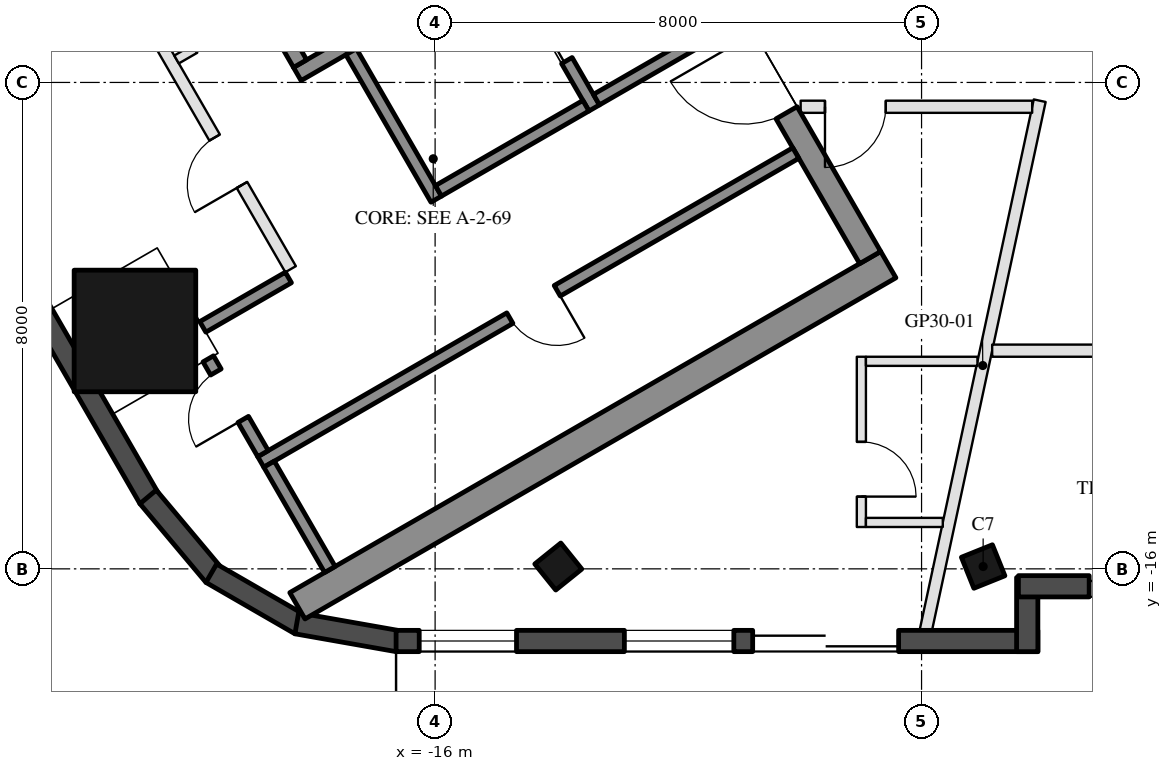
"""IFC4 building model, lengths in metres.
Left out: names, types, materials, properties, quantities, classifications, styles, units other than length and angle.
Written with IfcOpenShell. Run it as: python <this file> out.ifc"""

import sys

from ifc_helpers import new_model, si_unit, direction, frame, frame_2d, origin, origin_2d, place, context, subcontext, project, spatial, rectangle, hollow_rectangle, extrude, boolean, halfspace, element, fill, save


model = new_model("IFC4")
c1 = context("Model", 3, precision=1e-05, world=origin(), true_north=direction((0.0, 1.0)))
c2 = subcontext(c1, "Body", "Model", "MODEL_VIEW")
j1 = project(units=[si_unit("LENGTHUNIT", "METRE"), si_unit("PLANEANGLEUNIT", "RADIAN")], contexts=[c1])
p1 = place(None, origin())
s1 = spatial("IfcSite", under=j1, at=p1, CompositionType="ELEMENT")
p2 = place(p1, origin())
s2 = spatial("IfcBuilding", under=s1, at=p2, CompositionType="ELEMENT")
p3 = place(p2, frame((0.0, 0.0, 298.5)))
s3 = spatial("IfcBuildingStorey", under=s2, at=p3, CompositionType="ELEMENT", Elevation=298.5)
p4 = place(p3, frame((-13.974, -15.962, 0.0), z_axis=(0.121006106938, 0.150399778714, 0.981191840899), x_axis=(-0.992607126943, 0.008959505222, 0.121040566785)))
e1 = element("IfcColumn", 1, at=p4, inside=s3, PredefinedType="COLUMN", context=c2, shape_type="SweptSolid", body=[
    boolean("DIFFERENCE", boolean("DIFFERENCE", extrude(hollow_rectangle(XDim=0.55, YDim=0.55, WallThickness=0.025, at=origin_2d()), origin(), (0.0, 0.0, 1.0), 3.771), halfspace(frame((0.0, 0.0, 0.04), z_axis=(0.0, 0.0, 1.0), x_axis=(1.0, 0.0, 0.0)), True)), halfspace(frame((0.0, 0.0, 3.731), z_axis=(0.0, 0.0, 1.0), x_axis=(1.0, 0.0, 0.0)), False)),
])
p5 = place(p3, frame((-6.987, -15.962, 0.0), z_axis=(0.060870463553, 0.151232178432, 0.986622326361), x_axis=(-0.998135049207, 0.004661833801, 0.060866171632)))
e2 = element("IfcColumn", 2, at=p5, inside=s3, PredefinedType="COLUMN", context=c2, shape_type="SweptSolid", body=[
    boolean("DIFFERENCE", boolean("DIFFERENCE", extrude(hollow_rectangle(XDim=0.55, YDim=0.55, WallThickness=0.025, at=origin_2d()), origin(), (0.0, 0.0, 1.0), 3.75), halfspace(frame((0.0, 0.0, 0.034), z_axis=(0.0, 0.0, 1.0), x_axis=(1.0, 0.0, 0.0)), True)), halfspace(frame((0.0, 0.0, 3.716), z_axis=(0.0, 0.0, 1.0), x_axis=(1.0, 0.0, 0.0)), False)),
])
p6 = place(p3, frame((-20.936, -12.087, 0.0), z_axis=(0.190408197016, 0.109880592395, 0.975536249416), x_axis=(-0.499868084483, 0.866101551773, 1.1510724e-05)))
e3 = element("IfcColumn", 3, at=p6, inside=s3, PredefinedType="COLUMN", context=c2, shape_type="SweptSolid", body=[
    boolean("DIFFERENCE", boolean("DIFFERENCE", extrude(hollow_rectangle(XDim=2.0, YDim=2.0, WallThickness=0.05, at=origin_2d()), origin(), (0.0, 0.0, 1.0), 3.793), halfspace(frame((0.0, 0.0, 0.113), z_axis=(0.0, 0.0, 1.0), x_axis=(1.0, 0.0, 0.0)), True)), halfspace(frame((0.0, 0.0, 3.679), z_axis=(0.0, 0.0, 1.0), x_axis=(1.0, 0.0, 0.0)), False)),
])
p7 = place(p3, frame((-23.205, -10.508, 0.0), z_axis=(0.0, 0.0, 1.0), x_axis=(0.500016662025, -0.866015783746, 0.0)))
e4 = element("IfcWall", 4, at=p7, inside=s3, PredefinedType="SOLIDWALL", context=c2, shape_type="SweptSolid", body=[
    extrude(rectangle(XDim=5.004, YDim=0.35, at=frame_2d((2.502, 0.0))), origin(), (0.0, 0.0, 1.0), 3.55),
])
p8 = place(p3, frame((-20.72, -14.817, 0.0), z_axis=(0.0, 0.0, 1.0), x_axis=(0.642697100627, -0.766120380127, 0.0)))
e5 = element("IfcWall", 5, at=p8, inside=s3, PredefinedType="SOLIDWALL", context=c2, shape_type="SweptSolid", body=[
    extrude(rectangle(XDim=1.689, YDim=0.35, at=frame_2d((0.845, 0.0))), origin(), (0.0, 0.0, 1.0), 3.55),
])
for number, where, z_axis, x_axis in (
    (6, (-19.681, -16.072, 0.0), (0.0, 0.0, 1.0), (0.866, -0.5, 0.0)),
    (7, (-18.275, -16.896, 0.0), (0.0, 0.0, 1.0), (0.985, -0.174, 0.0)),
):
    element("IfcWall", number, at=place(p3, frame(where, z_axis=z_axis, x_axis=x_axis)), inside=s3, PredefinedType="SOLIDWALL", context=c2, shape_type="SweptSolid", body=[
        extrude(rectangle(XDim=1.689, YDim=0.35, at=frame_2d((0.845, 0.0))), origin(), (0.0, 0.0, 1.0), 3.55),
    ])
p9 = place(p3, frame((-16.642, -17.187, 0.0), z_axis=(0.0, 0.0, 1.0), x_axis=(1.0, 0.0, 0.0)))
e8 = element("IfcWall", 8, at=p9, inside=s3, PredefinedType="SOLIDWALL", context=c2, shape_type="SweptSolid", body=[
    extrude(rectangle(XDim=10.554, YDim=0.35, at=frame_2d((5.277, 0.0))), origin(), (0.0, 0.0, 1.0), 3.55),
])
p10 = place(p9, frame((0.38, 0.0, 0.3)))
e9 = element("IfcOpeningElement", 9, at=p10, cuts=e8, PredefinedType="OPENING", context=c2, shape_type="SweptSolid", body=[
    extrude(rectangle(XDim=1.6, YDim=2.65, at=frame_2d((0.8, 1.325))), frame((0.0, 0.185, 0.0), z_axis=(0.0, -1.0, 0.0), x_axis=(1.0, 0.0, 0.0)), (0.0, 0.0, 1.0), 0.37),
])
p11 = place(p9, frame((5.864, 0.0, 0.0)))
e10 = element("IfcOpeningElement", 10, at=p11, cuts=e8, PredefinedType="OPENING", context=c2, shape_type="SweptSolid", body=[
    extrude(rectangle(XDim=2.4, YDim=2.4, at=frame_2d((1.2, 1.2))), frame((0.0, 0.185, 0.0), z_axis=(0.0, -1.0, 0.0), x_axis=(1.0, 0.0, 0.0)), (0.0, 0.0, 1.0), 0.37),
])
p12 = place(p9, frame((3.754, 0.0, 0.3)))
e11 = element("IfcOpeningElement", 11, at=p12, cuts=e8, PredefinedType="OPENING", context=c2, shape_type="SweptSolid", body=[
    extrude(rectangle(XDim=1.8, YDim=2.65, at=frame_2d((0.9, 1.325))), frame((0.0, 0.185, 0.0), z_axis=(0.0, -1.0, 0.0), x_axis=(1.0, 0.0, 0.0)), (0.0, 0.0, 1.0), 0.37),
])
p13 = place(p3, frame((-6.262, -17.362, 0.0), z_axis=(0.0, 0.0, 1.0), x_axis=(0.0, 1.0, 0.0)))
e12 = element("IfcWall", 12, at=p13, inside=s3, PredefinedType="SOLIDWALL", context=c2, shape_type="SweptSolid", body=[
    extrude(rectangle(XDim=1.22, YDim=0.35, at=frame_2d((0.61, 0.0))), origin(), (0.0, 0.0, 1.0), 3.55),
])
p14 = place(p3, frame((-6.407, -16.287, 0.0), z_axis=(0.0, 0.0, 1.0), x_axis=(1.0, 0.0, 0.0)))
e13 = element("IfcWall", 13, at=p14, inside=s3, PredefinedType="SOLIDWALL", context=c2, shape_type="SweptSolid", body=[
    extrude(rectangle(XDim=5.827, YDim=0.35, at=frame_2d((2.914, 0.0))), origin(), (0.0, 0.0, 1.0), 3.55),
])
p15 = place(p14, frame((1.164, 0.0, 0.0)))
e14 = element("IfcOpeningElement", 14, at=p15, cuts=e13, PredefinedType="OPENING", context=c2, shape_type="SweptSolid", body=[
    extrude(rectangle(XDim=2.4, YDim=2.4, at=frame_2d((1.2, 1.2))), frame((0.0, 0.185, 0.0), z_axis=(0.0, -1.0, 0.0), x_axis=(1.0, 0.0, 0.0)), (0.0, 0.0, 1.0), 0.37),
])
for number, where, z_axis, x_axis in (
    (15, (-13.797, -1.903, 0.0), (0.0, 0.0, 1.0), (-0.866, -0.5, 0.0)),
    (16, (-8.547, -10.997, 0.0), (0.0, 0.0, 1.0), (-0.866, -0.5, 0.0)),
):
    element("IfcWall", number, at=place(p3, frame(where, z_axis=z_axis, x_axis=x_axis)), inside=s3, PredefinedType="SHEAR", context=c2, shape_type="SweptSolid", body=[
        extrude(rectangle(XDim=11.222, YDim=0.5, at=frame_2d((5.611, 0.0))), origin(), (0.0, 0.0, 1.0), 3.5),
    ])
p16 = place(p3, frame((-13.845, -2.22, 0.0), z_axis=(0.0, 0.0, 1.0), x_axis=(0.500004234368, -0.866022959057, 0.0)))
e17 = element("IfcWall", 17, at=p16, inside=s3, PredefinedType="SHEAR", context=c2, shape_type="SweptSolid", body=[
    extrude(rectangle(XDim=10.0, YDim=0.4, at=frame_2d((5.0, 0.0))), origin(), (0.0, 0.0, 1.0), 3.5),
])
p17 = place(p16, frame((3.55, 0.0, 0.0)))
e18 = element("IfcOpeningElement", 18, at=p17, cuts=e17, PredefinedType="OPENING", context=c2, shape_type="SweptSolid", body=[
    extrude(rectangle(XDim=1.1, YDim=2.1, at=frame_2d((0.55, 1.05))), frame((0.0, 0.21, 0.0), z_axis=(0.0, -1.0, 0.0), x_axis=(1.0, 0.0, 0.0)), (0.0, 0.0, 1.0), 0.42),
])
p18 = place(p16, frame((5.85, 0.0, 0.0)))
e19 = element("IfcOpeningElement", 19, at=p18, cuts=e17, PredefinedType="OPENING", context=c2, shape_type="SweptSolid", body=[
    extrude(rectangle(XDim=1.4, YDim=2.1, at=frame_2d((0.7, 1.05))), frame((0.0, 0.21, 0.0), z_axis=(0.0, -1.0, 0.0), x_axis=(1.0, 0.0, 0.0)), (0.0, 0.0, 1.0), 0.42),
])
p19 = place(p3, frame((-12.681, -4.636, 0.0), z_axis=(0.0, 0.0, 1.0), x_axis=(-0.866021702275, -0.500006411147, 0.0)))
e20 = element("IfcWall", 20, at=p19, inside=s3, PredefinedType="SHEAR", context=c2, shape_type="SweptSolid", body=[
    extrude(rectangle(XDim=6.45, YDim=0.25, at=frame_2d((3.225, 0.0))), origin(), (0.0, 0.0, 1.0), 3.5),
])
p20 = place(p19, frame((0.3, 0.0, 0.0)))
e21 = element("IfcOpeningElement", 21, at=p20, cuts=e20, PredefinedType="OPENING", context=c2, shape_type="SweptSolid", body=[
    extrude(rectangle(XDim=1.0, YDim=2.1, at=frame_2d((0.5, 1.05))), frame((0.0, 0.135, 0.0), z_axis=(0.0, -1.0, 0.0), x_axis=(1.0, 0.0, 0.0)), (0.0, 0.0, 1.0), 0.27),
])
p21 = place(p3, frame((-19.496, -5.482, 0.0), z_axis=(0.0, 0.0, 1.0), x_axis=(0.499990435942, -0.866030925526, 0.0)))
e22 = element("IfcWall", 22, at=p21, inside=s3, PredefinedType="SHEAR", context=c2, shape_type="SweptSolid", body=[
    extrude(rectangle(XDim=2.55, YDim=0.25, at=frame_2d((1.275, 0.0))), origin(), (0.0, 0.0, 1.0), 3.5),
])
p22 = place(p3, frame((-17.381, -7.495, 0.0), z_axis=(0.0, 0.0, 1.0), x_axis=(0.500011755427, -0.866018616679, 0.0)))
e23 = element("IfcWall", 23, at=p22, inside=s3, PredefinedType="SHEAR", context=c2, shape_type="SweptSolid", body=[
    extrude(rectangle(XDim=2.8, YDim=0.2, at=frame_2d((1.4, 0.0))), origin(), (0.0, 0.0, 1.0), 3.5),
])
p23 = place(p3, frame((-14.783, -5.995, 0.0), z_axis=(0.0, 0.0, 1.0), x_axis=(0.49994636267, -0.866056369097, 0.0)))
e24 = element("IfcWall", 24, at=p23, inside=s3, PredefinedType="SHEAR", context=c2, shape_type="SweptSolid", body=[
    extrude(rectangle(XDim=2.8, YDim=0.2, at=frame_2d((1.4, 0.0))), origin(), (0.0, 0.0, 1.0), 3.5),
])
p24 = place(p23, frame((0.7, 0.0, 0.0)))
e25 = element("IfcOpeningElement", 25, at=p24, cuts=e24, PredefinedType="OPENING", context=c2, shape_type="SweptSolid", body=[
    extrude(rectangle(XDim=1.2, YDim=2.1, at=frame_2d((0.6, 1.05))), frame((0.0, 0.11, 0.0), z_axis=(0.0, -1.0, 0.0), x_axis=(1.0, 0.0, 0.0)), (0.0, 0.0, 1.0), 0.22),
])
p25 = place(p3, frame((-13.52, -8.383, 0.0), z_axis=(0.0, 0.0, 1.0), x_axis=(-0.866034573852, -0.49998411664, 0.0)))
e26 = element("IfcWall", 26, at=p25, inside=s3, PredefinedType="SHEAR", context=c2, shape_type="SweptSolid", body=[
    extrude(rectangle(XDim=2.8, YDim=0.2, at=frame_2d((1.4, 0.0))), origin(), (0.0, 0.0, 1.0), 3.5),
])
p26 = place(p3, frame((-11.268, -7.083, 0.0), z_axis=(0.0, 0.0, 1.0), x_axis=(-0.866050077142, -0.499957262057, 0.0)))
e27 = element("IfcWall", 27, at=p26, inside=s3, PredefinedType="SHEAR", context=c2, shape_type="SweptSolid", body=[
    extrude(rectangle(XDim=2.4, YDim=0.2, at=frame_2d((1.2, 0.0))), origin(), (0.0, 0.0, 1.0), 3.5),
])
p27 = place(p3, frame((-10.068, -9.162, 0.0), z_axis=(0.0, 0.0, 1.0), x_axis=(-0.866032725843, -0.499987317609, 0.0)))
e28 = element("IfcWall", 28, at=p27, inside=s3, PredefinedType="SHEAR", context=c2, shape_type="SweptSolid", body=[
    extrude(rectangle(XDim=10.16, YDim=0.2, at=frame_2d((5.08, 0.0))), origin(), (0.0, 0.0, 1.0), 3.5),
])
p28 = place(p27, frame((4.53, 0.0, 0.0)))
e29 = element("IfcOpeningElement", 29, at=p28, cuts=e28, PredefinedType="OPENING", context=c2, shape_type="SweptSolid", body=[
    extrude(rectangle(XDim=0.9, YDim=2.1, at=frame_2d((0.45, 1.05))), frame((0.0, 0.11, 0.0), z_axis=(0.0, -1.0, 0.0), x_axis=(1.0, 0.0, 0.0)), (0.0, 0.0, 1.0), 0.22),
])
p29 = place(p3, frame((-19.73, -12.546, 0.0), z_axis=(0.0, 0.0, 1.0), x_axis=(0.500004188491, -0.866022985545, 0.0)))
e30 = element("IfcWall", 30, at=p29, inside=s3, PredefinedType="SHEAR", context=c2, shape_type="SweptSolid", body=[
    extrude(rectangle(XDim=1.8, YDim=0.2, at=frame_2d((0.9, 0.0))), origin(), (0.0, 0.0, 1.0), 3.5),
])
p30 = place(p29, frame((0.25, 0.0, 0.0)))
e31 = element("IfcOpeningElement", 31, at=p30, cuts=e30, PredefinedType="OPENING", context=c2, shape_type="SweptSolid", body=[
    extrude(rectangle(XDim=0.9, YDim=2.1, at=frame_2d((0.45, 1.05))), frame((0.0, 0.11, 0.0), z_axis=(0.0, -1.0, 0.0), x_axis=(1.0, 0.0, 0.0)), (0.0, 0.0, 1.0), 0.22),
])
p31 = place(p3, frame((-18.413, -11.208, 0.0), z_axis=(0.0, 0.0, 1.0), x_axis=(-0.866053003207, -0.499952193351, 0.0)))
e32 = element("IfcWall", 32, at=p31, inside=s3, PredefinedType="SHEAR", context=c2, shape_type="SweptSolid", body=[
    extrude(rectangle(XDim=1.625, YDim=0.2, at=frame_2d((0.812, 0.0))), origin(), (0.0, 0.0, 1.0), 3.5),
])
p32 = place(p3, frame((-18.73, -14.278, 0.0), z_axis=(0.0, 0.0, 1.0), x_axis=(0.50002537861, -0.866010750942, 0.0)))
e33 = element("IfcWall", 33, at=p32, inside=s3, PredefinedType="SHEAR", context=c2, shape_type="SweptSolid", body=[
    extrude(rectangle(XDim=2.0, YDim=0.2, at=frame_2d((1.0, 0.0))), origin(), (0.0, 0.0, 1.0), 3.5),
])
p33 = place(p3, frame((-21.076, -6.395, 0.0), z_axis=(0.0, 0.0, 1.0), x_axis=(0.50001468107, -0.866016927499, 0.0)))
e34 = element("IfcWall", 34, at=p33, inside=s3, PredefinedType="PARTITIONING", context=c2, shape_type="SweptSolid", body=[
    extrude(rectangle(XDim=5.4, YDim=0.2, at=frame_2d((2.7, 0.0))), origin(), (0.0, 0.0, 1.0), 3.5),
])
p34 = place(p33, frame((2.9, 0.0, 0.0)))
e35 = element("IfcOpeningElement", 35, at=p34, cuts=e34, PredefinedType="OPENING", context=c2, shape_type="SweptSolid", body=[
    extrude(rectangle(XDim=0.9, YDim=2.1, at=frame_2d((0.45, 1.05))), frame((0.0, 0.11, 0.0), z_axis=(0.0, -1.0, 0.0), x_axis=(1.0, 0.0, 0.0)), (0.0, 0.0, 1.0), 0.22),
])
p35 = place(p3, frame((-18.866, -6.822, 0.0), z_axis=(0.0, 0.0, 1.0), x_axis=(-0.866028054938, -0.499995408039, 0.0)))
e36 = element("IfcWall", 36, at=p35, inside=s3, PredefinedType="PARTITIONING", context=c2, shape_type="SweptSolid", body=[
    extrude(rectangle(XDim=1.6, YDim=0.15, at=frame_2d((0.8, 0.0))), origin(), (0.0, 0.0, 1.0), 3.5),
])
p36 = place(p35, frame((0.35, 0.0, 0.0)))
e37 = element("IfcOpeningElement", 37, at=p36, cuts=e36, PredefinedType="OPENING", context=c2, shape_type="SweptSolid", body=[
    extrude(rectangle(XDim=0.9, YDim=2.1, at=frame_2d((0.45, 1.05))), frame((0.0, 0.085, 0.0), z_axis=(0.0, -1.0, 0.0), x_axis=(1.0, 0.0, 0.0)), (0.0, 0.0, 1.0), 0.17),
])
p37 = place(p3, frame((-7.93, -17.012, 0.0), z_axis=(0.0, 0.0, 1.0), x_axis=(0.210200768645, 0.97765824134, 0.0)))
e38 = element("IfcWall", 38, at=p37, inside=s3, PredefinedType="PARTITIONING", context=c2, shape_type="SweptSolid", body=[
    extrude(rectangle(XDim=8.911, YDim=0.2, at=frame_2d((4.455, 0.0))), origin(), (0.0, 0.0, 1.0), 3.1),
])
p38 = place(p3, frame((-6.181, -8.4, 0.0), z_axis=(0.0, 0.0, 1.0), x_axis=(-1.0, 0.0, 0.0)))
e39 = element("IfcWall", 39, at=p38, inside=s3, PredefinedType="PARTITIONING", context=c2, shape_type="SweptSolid", body=[
    extrude(rectangle(XDim=3.807, YDim=0.2, at=frame_2d((1.904, 0.0))), origin(), (0.0, 0.0, 1.0), 3.1),
])
p39 = place(p38, frame((2.407, 0.0, 0.0)))
e40 = element("IfcOpeningElement", 40, at=p39, cuts=e39, PredefinedType="OPENING", context=c2, shape_type="SweptSolid", body=[
    extrude(rectangle(XDim=1.0, YDim=2.1, at=frame_2d((0.5, 1.05))), frame((0.0, 0.11, 0.0), z_axis=(0.0, -1.0, 0.0), x_axis=(1.0, 0.0, 0.0)), (0.0, 0.0, 1.0), 0.22),
])
p40 = place(p3, frame((-8.99, -12.512, 0.0), z_axis=(0.0, 0.0, 1.0), x_axis=(0.0, -1.0, 0.0)))
e41 = element("IfcWall", 41, at=p40, inside=s3, PredefinedType="PARTITIONING", context=c2, shape_type="SweptSolid", body=[
    extrude(rectangle(XDim=2.8, YDim=0.15, at=frame_2d((1.4, 0.0))), origin(), (0.0, 0.0, 1.0), 3.1),
])
p41 = place(p40, frame((1.4, 0.0, 0.0)))
e42 = element("IfcOpeningElement", 42, at=p41, cuts=e41, PredefinedType="OPENING", context=c2, shape_type="SweptSolid", body=[
    extrude(rectangle(XDim=0.9, YDim=2.1, at=frame_2d((0.45, 1.05))), frame((0.0, 0.085, 0.0), z_axis=(0.0, -1.0, 0.0), x_axis=(1.0, 0.0, 0.0)), (0.0, 0.0, 1.0), 0.17),
])
p42 = place(p3, frame((-8.915, -15.237, 0.0), z_axis=(0.0, 0.0, 1.0), x_axis=(1.0, 0.0, 0.0)))
e43 = element("IfcWall", 43, at=p42, inside=s3, PredefinedType="PARTITIONING", context=c2, shape_type="SweptSolid", body=[
    extrude(rectangle(XDim=1.264, YDim=0.15, at=frame_2d((0.632, 0.0))), origin(), (0.0, 0.0, 1.0), 3.1),
])
p43 = place(p3, frame((-8.915, -12.587, 0.0), z_axis=(0.0, 0.0, 1.0), x_axis=(1.0, 0.0, 0.0)))
e44 = element("IfcWall", 44, at=p43, inside=s3, PredefinedType="PARTITIONING", context=c2, shape_type="SweptSolid", body=[
    extrude(rectangle(XDim=1.834, YDim=0.15, at=frame_2d((0.917, 0.0))), origin(), (0.0, 0.0, 1.0), 3.55),
])
p44 = place(p3, frame((-2.1, -12.412, 0.0), z_axis=(0.0, 0.0, 1.0), x_axis=(-1.0, 0.0, 0.0)))
e45 = element("IfcWall", 45, at=p44, inside=s3, PredefinedType="PARTITIONING", context=c2, shape_type="SweptSolid", body=[
    extrude(rectangle(XDim=4.739, YDim=0.2, at=frame_2d((2.369, 0.0))), origin(), (0.0, 0.0, 1.0), 3.1),
])
p45 = place(p44, frame((1.869, 0.0, 0.0)))
e46 = element("IfcOpeningElement", 46, at=p45, cuts=e45, PredefinedType="OPENING", context=c2, shape_type="SweptSolid", body=[
    extrude(rectangle(XDim=1.0, YDim=2.1, at=frame_2d((0.5, 1.05))), frame((0.0, 0.11, 0.0), z_axis=(0.0, -1.0, 0.0), x_axis=(1.0, 0.0, 0.0)), (0.0, 0.0, 1.0), 0.22),
])
p46 = place(p10, origin())
e47 = element("IfcWindow", 47, at=p46, inside=s3, PartitioningType="SINGLE_PANEL", PredefinedType="WINDOW", context=c2, shape_type="SweptSolid", body=[
    extrude(rectangle(XDim=1.6, YDim=2.65, at=frame_2d((0.8, 1.325))), frame((0.0, 0.03, 0.0), z_axis=(0.0, -1.0, 0.0), x_axis=(1.0, 0.0, 0.0)), (0.0, 0.0, 1.0), 0.06),
])
fill(e9, e47)
p47 = place(p11, frame((2.4, 0.0, 0.0), z_axis=(0.0, 0.0, 1.0), x_axis=(-1.0, 0.0, 0.0)))
e48 = element("IfcDoor", 48, at=p47, inside=s3, OperationType="SLIDING_TO_LEFT", PredefinedType="DOOR", context=c2, shape_type="SweptSolid", body=[
    extrude(rectangle(XDim=2.4, YDim=2.4, at=frame_2d((1.2, 1.2))), frame((0.0, 0.025, 0.0), z_axis=(0.0, -1.0, 0.0), x_axis=(1.0, 0.0, 0.0)), (0.0, 0.0, 1.0), 0.05),
])
fill(e10, e48)
p48 = place(p12, origin())
e49 = element("IfcWindow", 49, at=p48, inside=s3, PartitioningType="SINGLE_PANEL", PredefinedType="WINDOW", context=c2, shape_type="SweptSolid", body=[
    extrude(rectangle(XDim=1.8, YDim=2.65, at=frame_2d((0.9, 1.325))), frame((0.0, 0.03, 0.0), z_axis=(0.0, -1.0, 0.0), x_axis=(1.0, 0.0, 0.0)), (0.0, 0.0, 1.0), 0.06),
])
fill(e11, e49)
p49 = place(p15, frame((2.4, 0.0, 0.0), z_axis=(0.0, 0.0, 1.0), x_axis=(-1.0, 0.0, 0.0)))
e50 = element("IfcDoor", 50, at=p49, inside=s3, OperationType="SLIDING_TO_LEFT", PredefinedType="DOOR", context=c2, shape_type="SweptSolid", body=[
    extrude(rectangle(XDim=2.4, YDim=2.4, at=frame_2d((1.2, 1.2))), frame((0.0, 0.025, 0.0), z_axis=(0.0, -1.0, 0.0), x_axis=(1.0, 0.0, 0.0)), (0.0, 0.0, 1.0), 0.05),
])
fill(e14, e50)
p50 = place(p24, origin())
e51 = element("IfcDoor", 51, at=p50, inside=s3, OperationType="DOUBLE_DOOR_SLIDING", PredefinedType="DOOR", context=c2, shape_type="SweptSolid", body=[
    extrude(rectangle(XDim=1.2, YDim=2.1, at=frame_2d((0.6, 1.05))), frame((0.0, 0.025, 0.0), z_axis=(0.0, -1.0, 0.0), x_axis=(1.0, 0.0, 0.0)), (0.0, 0.0, 1.0), 0.05),
])
fill(e25, e51)
p51 = place(p28, origin())
e52 = element("IfcDoor", 52, at=p51, inside=s3, OperationType="SINGLE_SWING_LEFT", PredefinedType="DOOR", context=c2, shape_type="SweptSolid", body=[
    extrude(rectangle(XDim=0.9, YDim=2.1, at=frame_2d((0.45, 1.05))), frame((0.0, 0.025, 0.0), z_axis=(0.0, -1.0, 0.0), x_axis=(1.0, 0.0, 0.0)), (0.0, 0.0, 1.0), 0.05),
])
fill(e29, e52)
p52 = place(p30, frame((0.9, 0.0, 0.0), z_axis=(0.0, 0.0, 1.0), x_axis=(-1.0, 0.0, 0.0)))
e53 = element("IfcDoor", 53, at=p52, inside=s3, OperationType="SINGLE_SWING_LEFT", PredefinedType="DOOR", context=c2, shape_type="SweptSolid", body=[
    extrude(rectangle(XDim=0.9, YDim=2.1, at=frame_2d((0.45, 1.05))), frame((0.0, 0.025, 0.0), z_axis=(0.0, -1.0, 0.0), x_axis=(1.0, 0.0, 0.0)), (0.0, 0.0, 1.0), 0.05),
])
fill(e31, e53)
p53 = place(p34, frame((0.9, 0.0, 0.0), z_axis=(0.0, 0.0, 1.0), x_axis=(-1.0, 0.0, 0.0)))
e54 = element("IfcDoor", 54, at=p53, inside=s3, OperationType="SINGLE_SWING_LEFT", PredefinedType="DOOR", context=c2, shape_type="SweptSolid", body=[
    extrude(rectangle(XDim=0.9, YDim=2.1, at=frame_2d((0.45, 1.05))), frame((0.0, 0.025, 0.0), z_axis=(0.0, -1.0, 0.0), x_axis=(1.0, 0.0, 0.0)), (0.0, 0.0, 1.0), 0.05),
])
fill(e35, e54)
p54 = place(p18, frame((1.4, 0.0, 0.0), z_axis=(0.0, 0.0, 1.0), x_axis=(-1.0, 0.0, 0.0)))
e55 = element("IfcDoor", 55, at=p54, inside=s3, OperationType="DOUBLE_DOOR_SINGLE_SWING", PredefinedType="DOOR", context=c2, shape_type="SweptSolid", body=[
    extrude(rectangle(XDim=1.4, YDim=2.1, at=frame_2d((0.7, 1.05))), frame((0.0, 0.025, 0.0), z_axis=(0.0, -1.0, 0.0), x_axis=(1.0, 0.0, 0.0)), (0.0, 0.0, 1.0), 0.05),
])
fill(e19, e55)
p55 = place(p41, origin())
e56 = element("IfcDoor", 56, at=p55, inside=s3, OperationType="SINGLE_SWING_RIGHT", PredefinedType="DOOR", context=c2, shape_type="SweptSolid", body=[
    extrude(rectangle(XDim=0.9, YDim=2.1, at=frame_2d((0.45, 1.05))), frame((0.0, 0.025, 0.0), z_axis=(0.0, -1.0, 0.0), x_axis=(1.0, 0.0, 0.0)), (0.0, 0.0, 1.0), 0.05),
])
fill(e42, e56)
p56 = place(p39, origin())
e57 = element("IfcDoor", 57, at=p56, inside=s3, OperationType="SINGLE_SWING_RIGHT", PredefinedType="DOOR", context=c2, shape_type="SweptSolid", body=[
    extrude(rectangle(XDim=1.0, YDim=2.1, at=frame_2d((0.5, 1.05))), frame((0.0, 0.025, 0.0), z_axis=(0.0, -1.0, 0.0), x_axis=(1.0, 0.0, 0.0)), (0.0, 0.0, 1.0), 0.05),
])
fill(e40, e57)
save(model, sys.argv[1])
